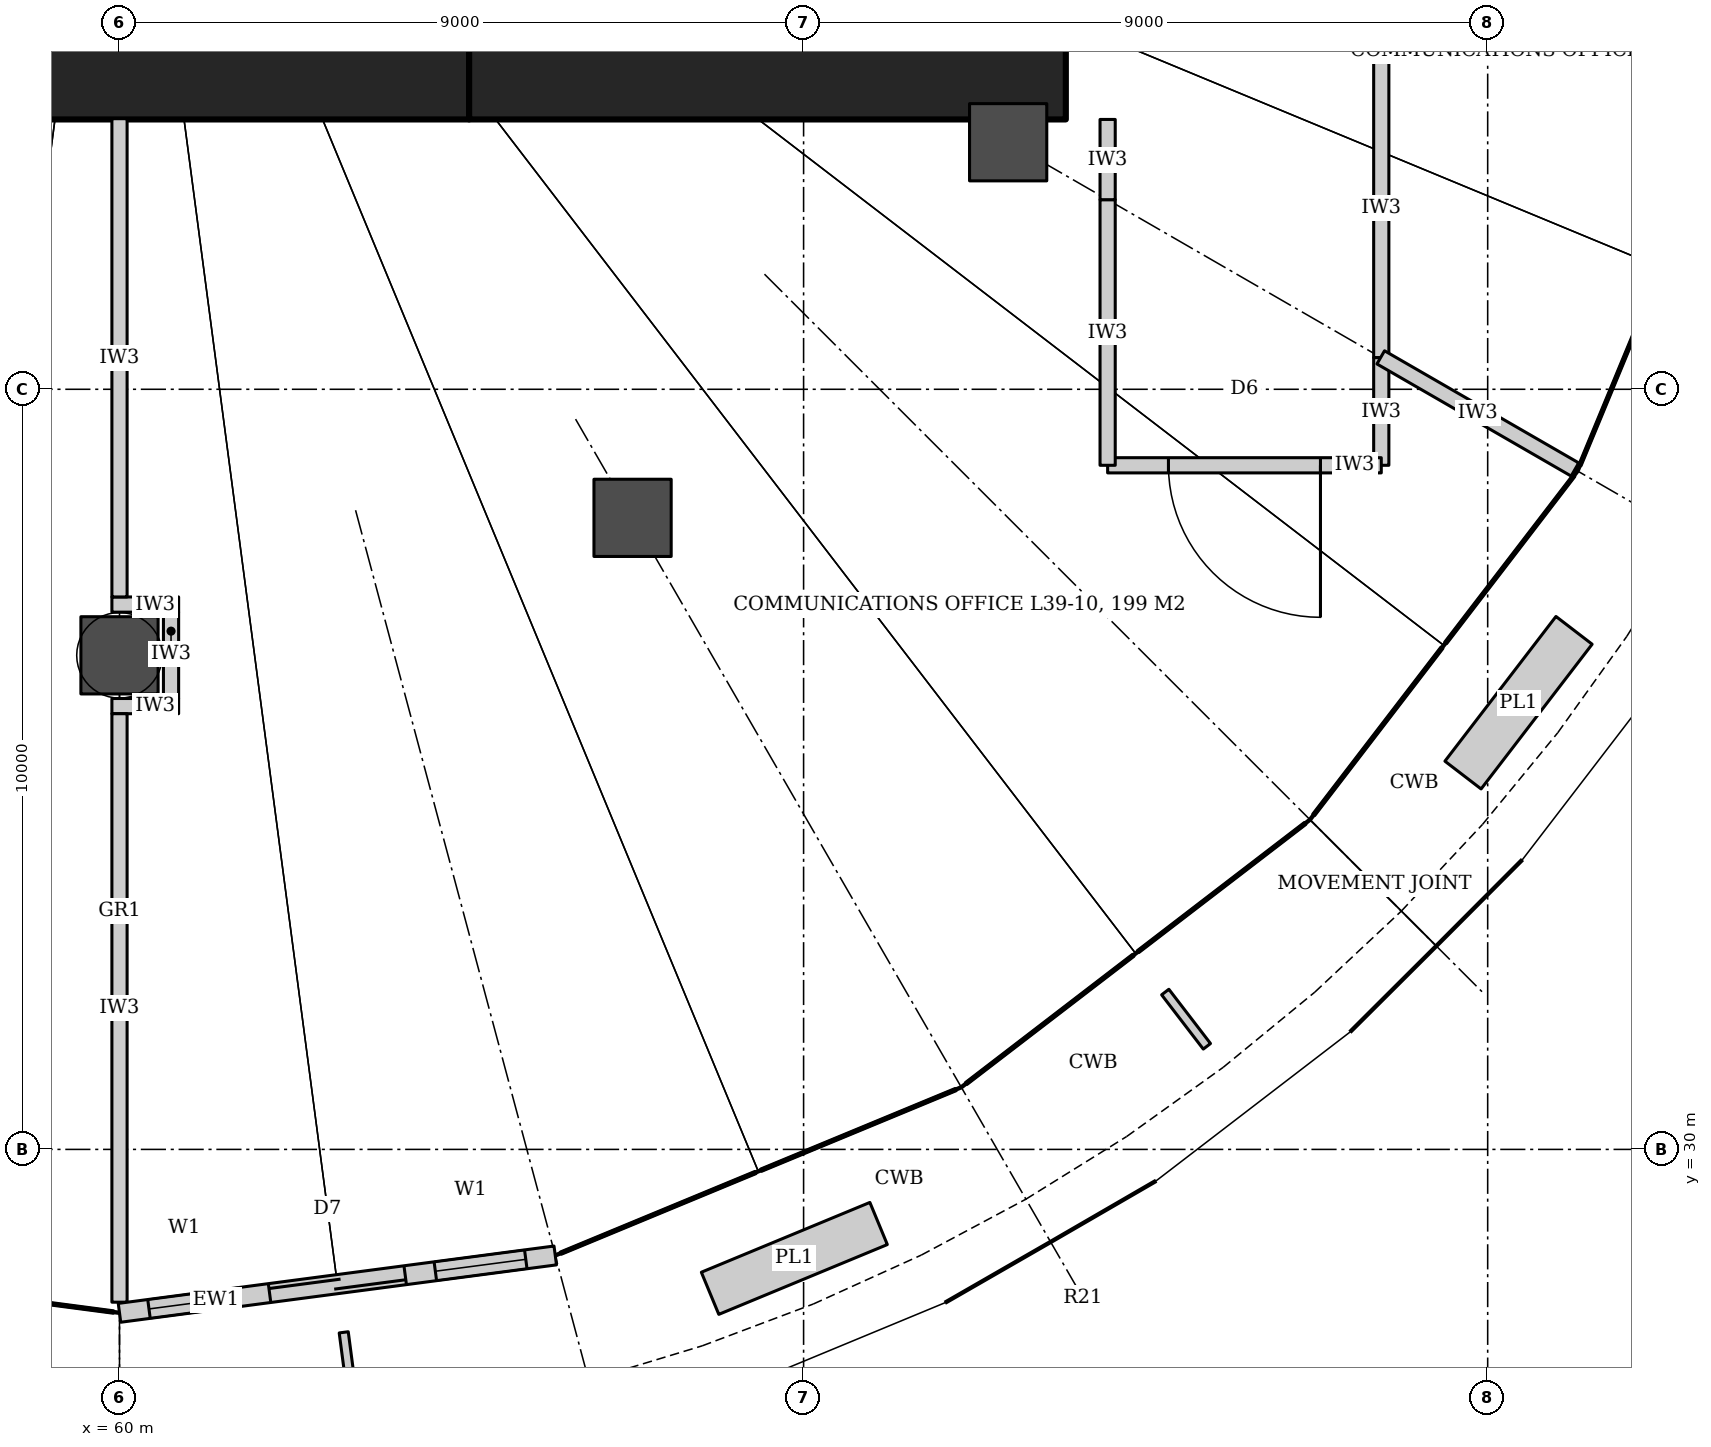
"""IFC4 building model, lengths in metres.
Left out: names, types, materials, properties, quantities, classifications, styles, units other than length and angle.
Written with IfcOpenShell. Run it as: python <this file> out.ifc"""

import sys

from ifc_helpers import new_model, si_unit, direction, frame, frame_2d, origin, origin_2d, place, context, subcontext, project, spatial, rectangle, hollow_circle, extrude, element, fill, save


model = new_model("IFC4")
c1 = context("Model", 3, precision=1e-05, world=origin(), true_north=direction((0.0, 1.0)))
c2 = subcontext(c1, "Body", "Model", "MODEL_VIEW")
j1 = project(units=[si_unit("LENGTHUNIT", "METRE"), si_unit("PLANEANGLEUNIT", "RADIAN")], contexts=[c1])
p1 = place(None, origin())
s1 = spatial("IfcSite", under=j1, at=p1, CompositionType="ELEMENT")
p2 = place(p1, origin())
s2 = spatial("IfcBuilding", under=s1, at=p2, CompositionType="ELEMENT")
p3 = place(p2, frame((0.0, 0.0, 173.0)))
s3 = spatial("IfcBuildingStorey", under=s2, at=p3, CompositionType="ELEMENT", Elevation=173.0)
p4 = place(p3, frame((55.4, 44.45, 0.0), z_axis=(0.0, 0.0, 1.0), x_axis=(1.0, 0.0, 0.0)))
e1 = element("IfcWall", 1, at=p4, inside=s3, PredefinedType="SHEAR", context=c2, shape_type="SweptSolid", body=[
    extrude(rectangle(XDim=9.2, YDim=1.8, at=frame_2d((4.6, 0.0))), origin(), (0.0, 0.0, 1.0), 4.2),
])
p5 = place(p3, frame((64.6, 44.45, 0.0), z_axis=(0.0, 0.0, 1.0), x_axis=(1.0, 0.0, 0.0)))
e2 = element("IfcWall", 2, at=p5, inside=s3, PredefinedType="SHEAR", context=c2, shape_type="SweptSolid", body=[
    extrude(rectangle(XDim=7.85, YDim=1.8, at=frame_2d((3.925, 0.0))), origin(), (0.0, 0.0, 1.0), 4.2),
])
for number, where, z_axis, x_axis in (
    (3, (60.0, 36.5, 0.0), (0.0, 0.0, 1.0), (1.0, 0.0, 0.0)),
    (4, (66.75, 38.309, 0.0), (0.0, 0.0, 1.0), (1.0, 0.0, 0.0)),
    (5, (71.691, 43.25, 0.0), (0.0, 0.0, 1.0), (1.0, 0.0, 0.0)),
):
    element("IfcColumn", number, at=place(p3, frame(where, z_axis=z_axis, x_axis=x_axis)), inside=s3, PredefinedType="COLUMN", context=c2, shape_type="SweptSolid", body=[
        extrude(hollow_circle(Radius=0.508, WallThickness=0.05, at=origin_2d()), origin(), (0.0, 0.0, 1.0), 4.2),
    ])
p6 = place(p3, frame((76.6, 50.0, 0.0), z_axis=(0.0, 0.0, 1.0), x_axis=(0.0, -1.0, 0.0)))
e6 = element("IfcWall", 6, at=p6, inside=s3, PredefinedType="PARTITIONING", context=c2, shape_type="SweptSolid", body=[
    extrude(rectangle(XDim=9.584, YDim=0.2, at=frame_2d((4.792, 0.0))), origin(), (0.0, 0.0, 1.0), 3.012),
])
p7 = place(p6, frame((4.292, 0.0, 0.0)))
e7 = element("IfcOpeningElement", 7, at=p7, cuts=e6, PredefinedType="OPENING", context=c2, shape_type="SweptSolid", body=[
    extrude(rectangle(XDim=1.0, YDim=2.1, at=frame_2d((0.5, 1.05))), frame((0.0, 0.11, 0.0), z_axis=(0.0, -1.0, 0.0), x_axis=(1.0, 0.0, 0.0)), (0.0, 0.0, 1.0), 0.22),
])
p8 = place(p3, frame((76.6, 40.416, 0.0), z_axis=(0.0, 0.0, 1.0), x_axis=(0.0, -1.0, 0.0)))
e8 = element("IfcWall", 8, at=p8, inside=s3, PredefinedType="PARTITIONING", context=c2, shape_type="SweptSolid", body=[
    extrude(rectangle(XDim=1.416, YDim=0.2, at=frame_2d((0.708, 0.0))), origin(), (0.0, 0.0, 1.0), 3.012),
])
p9 = place(p3, frame((76.6, 39.0, 0.0), z_axis=(0.0, 0.0, 1.0), x_axis=(-1.0, 0.0, 0.0)))
e9 = element("IfcWall", 9, at=p9, inside=s3, PredefinedType="PARTITIONING", context=c2, shape_type="SweptSolid", body=[
    extrude(rectangle(XDim=3.6, YDim=0.2, at=frame_2d((1.8, 0.0))), origin(), (0.0, 0.0, 1.0), 3.04),
])
p10 = place(p9, frame((0.8, 0.0, 0.0)))
e10 = element("IfcOpeningElement", 10, at=p10, cuts=e9, PredefinedType="OPENING", context=c2, shape_type="SweptSolid", body=[
    extrude(rectangle(XDim=2.0, YDim=2.1, at=frame_2d((1.0, 1.05))), frame((0.0, 0.11, 0.0), z_axis=(0.0, -1.0, 0.0), x_axis=(1.0, 0.0, 0.0)), (0.0, 0.0, 1.0), 0.22),
])
p11 = place(p3, frame((73.0, 39.0, 0.0), z_axis=(0.0, 0.0, 1.0), x_axis=(0.0, 1.0, 0.0)))
e11 = element("IfcWall", 11, at=p11, inside=s3, PredefinedType="PARTITIONING", context=c2, shape_type="SweptSolid", body=[
    extrude(rectangle(XDim=3.494, YDim=0.2, at=frame_2d((1.747, 0.0))), origin(), (0.0, 0.0, 1.0), 3.012),
])
p12 = place(p3, frame((73.0, 42.494, 0.0), z_axis=(0.0, 0.0, 1.0), x_axis=(0.0, 1.0, 0.0)))
e12 = element("IfcWall", 12, at=p12, inside=s3, PredefinedType="PARTITIONING", context=c2, shape_type="SweptSolid", body=[
    extrude(rectangle(XDim=1.056, YDim=0.2, at=frame_2d((0.528, 0.0))), origin(), (0.0, 0.0, 1.0), 3.012),
])
for number, where, z_axis, x_axis in (
    (13, (59.9, 37.168, 0.0), (0.0, 0.0, 1.0), (1.0, 0.0, 0.0)),
    (14, (59.9, 35.832, 0.0), (0.0, 0.0, 1.0), (1.0, 0.0, 0.0)),
):
    element("IfcWall", number, at=place(p3, frame(where, z_axis=z_axis, x_axis=x_axis)), inside=s3, PredefinedType="PARTITIONING", context=c2, shape_type="SweptSolid", body=[
        extrude(rectangle(XDim=0.878, YDim=0.2, at=frame_2d((0.439, 0.0))), origin(), (0.0, 0.0, 1.0), 3.012),
    ])
p13 = place(p3, frame((60.678, 37.068, 0.0), z_axis=(0.0, 0.0, 1.0), x_axis=(0.0, -1.0, 0.0)))
e15 = element("IfcWall", 15, at=p13, inside=s3, PredefinedType="PARTITIONING", context=c2, shape_type="SweptSolid", body=[
    extrude(rectangle(XDim=1.136, YDim=0.2, at=frame_2d((0.568, 0.0))), origin(), (0.0, 0.0, 1.0), 3.012),
])
p14 = place(p3, frame((60.0, 43.56, 0.0), z_axis=(0.0, 0.0, 1.0), x_axis=(0.0, -1.0, 0.0)))
e16 = element("IfcWall", 16, at=p14, inside=s3, PredefinedType="PARTITIONING", context=c2, shape_type="SweptSolid", body=[
    extrude(rectangle(XDim=6.292, YDim=0.2, at=frame_2d((3.146, 0.0))), origin(), (0.0, 0.0, 1.0), 3.04),
])
p15 = place(p3, frame((60.0, 35.732, 0.0), z_axis=(0.0, 0.0, 1.0), x_axis=(0.0, -1.0, 0.0)))
e17 = element("IfcWall", 17, at=p15, inside=s3, PredefinedType="PARTITIONING", context=c2, shape_type="SweptSolid", body=[
    extrude(rectangle(XDim=7.742, YDim=0.2, at=frame_2d((3.871, 0.0))), origin(), (0.0, 0.0, 1.0), 3.012),
])
p16 = place(p3, frame((76.593, 40.42, 0.0), z_axis=(0.0, 0.0, 1.0), x_axis=(0.866039495442, -0.49997559174, 0.0)))
e18 = element("IfcWall", 18, at=p16, inside=s3, PredefinedType="PARTITIONING", context=c2, shape_type="SweptSolid", body=[
    extrude(rectangle(XDim=2.95, YDim=0.2, at=frame_2d((1.475, 0.0))), origin(), (0.0, 0.0, 1.0), 3.012),
])
p17 = place(p3, frame((60.0, 27.85, 0.0), z_axis=(0.0, 0.0, 1.0), x_axis=(0.991447396143, 0.130506937291, 0.0)))
e19 = element("IfcWall", 19, at=p17, inside=s3, PredefinedType="SOLIDWALL", context=c2, shape_type="SweptSolid", body=[
    extrude(rectangle(XDim=5.782, YDim=0.25, at=frame_2d((2.891, 0.0))), origin(), (0.0, 0.0, 1.0), 4.04),
])
p18 = place(p17, frame((1.991, 0.0, 0.0)))
e20 = element("IfcOpeningElement", 20, at=p18, cuts=e19, PredefinedType="OPENING", context=c2, shape_type="SweptSolid", body=[
    extrude(rectangle(XDim=1.8, YDim=2.4, at=frame_2d((0.9, 1.2))), frame((0.0, 0.135, 0.0), z_axis=(0.0, -1.0, 0.0), x_axis=(1.0, 0.0, 0.0)), (0.0, 0.0, 1.0), 0.27),
])
p19 = place(p17, frame((0.391, 0.0, 0.0)))
e21 = element("IfcOpeningElement", 21, at=p19, cuts=e19, PredefinedType="OPENING", context=c2, shape_type="SweptSolid", body=[
    extrude(rectangle(XDim=1.2, YDim=2.4, at=frame_2d((0.6, 1.2))), frame((0.0, 0.135, 0.0), z_axis=(0.0, -1.0, 0.0), x_axis=(1.0, 0.0, 0.0)), (0.0, 0.0, 1.0), 0.27),
])
p20 = place(p17, frame((4.191, 0.0, 0.0)))
e22 = element("IfcOpeningElement", 22, at=p20, cuts=e19, PredefinedType="OPENING", context=c2, shape_type="SweptSolid", body=[
    extrude(rectangle(XDim=1.2, YDim=2.4, at=frame_2d((0.6, 1.2))), frame((0.0, 0.135, 0.0), z_axis=(0.0, -1.0, 0.0), x_axis=(1.0, 0.0, 0.0)), (0.0, 0.0, 1.0), 0.27),
])
p21 = place(p10, origin())
e23 = element("IfcDoor", 23, at=p21, inside=s3, OperationType="DOUBLE_DOOR_DOUBLE_SWING", PredefinedType="DOOR", context=c2, shape_type="SweptSolid", body=[
    extrude(rectangle(XDim=2.0, YDim=2.1, at=frame_2d((1.0, 1.05))), frame((0.0, 0.025, 0.0), z_axis=(0.0, -1.0, 0.0), x_axis=(1.0, 0.0, 0.0)), (0.0, 0.0, 1.0), 0.05),
])
fill(e10, e23)
p22 = place(p18, origin())
e24 = element("IfcDoor", 24, at=p22, inside=s3, OperationType="DOUBLE_DOOR_SLIDING", PredefinedType="DOOR", context=c2, shape_type="SweptSolid", body=[
    extrude(rectangle(XDim=1.8, YDim=2.4, at=frame_2d((0.9, 1.2))), frame((0.0, 0.025, 0.0), z_axis=(0.0, -1.0, 0.0), x_axis=(1.0, 0.0, 0.0)), (0.0, 0.0, 1.0), 0.05),
])
fill(e20, e24)
p23 = place(p19, origin())
e25 = element("IfcWindow", 25, at=p23, inside=s3, PartitioningType="SINGLE_PANEL", PredefinedType="WINDOW", context=c2, shape_type="SweptSolid", body=[
    extrude(rectangle(XDim=1.2, YDim=2.4, at=frame_2d((0.6, 1.2))), frame((0.0, 0.03, 0.0), z_axis=(0.0, -1.0, 0.0), x_axis=(1.0, 0.0, 0.0)), (0.0, 0.0, 1.0), 0.06),
])
fill(e21, e25)
p24 = place(p20, origin())
e26 = element("IfcWindow", 26, at=p24, inside=s3, PartitioningType="SINGLE_PANEL", PredefinedType="WINDOW", context=c2, shape_type="SweptSolid", body=[
    extrude(rectangle(XDim=1.2, YDim=2.4, at=frame_2d((0.6, 1.2))), frame((0.0, 0.03, 0.0), z_axis=(0.0, -1.0, 0.0), x_axis=(1.0, 0.0, 0.0)), (0.0, 0.0, 1.0), 0.06),
])
fill(e22, e26)
save(model, sys.argv[1])
